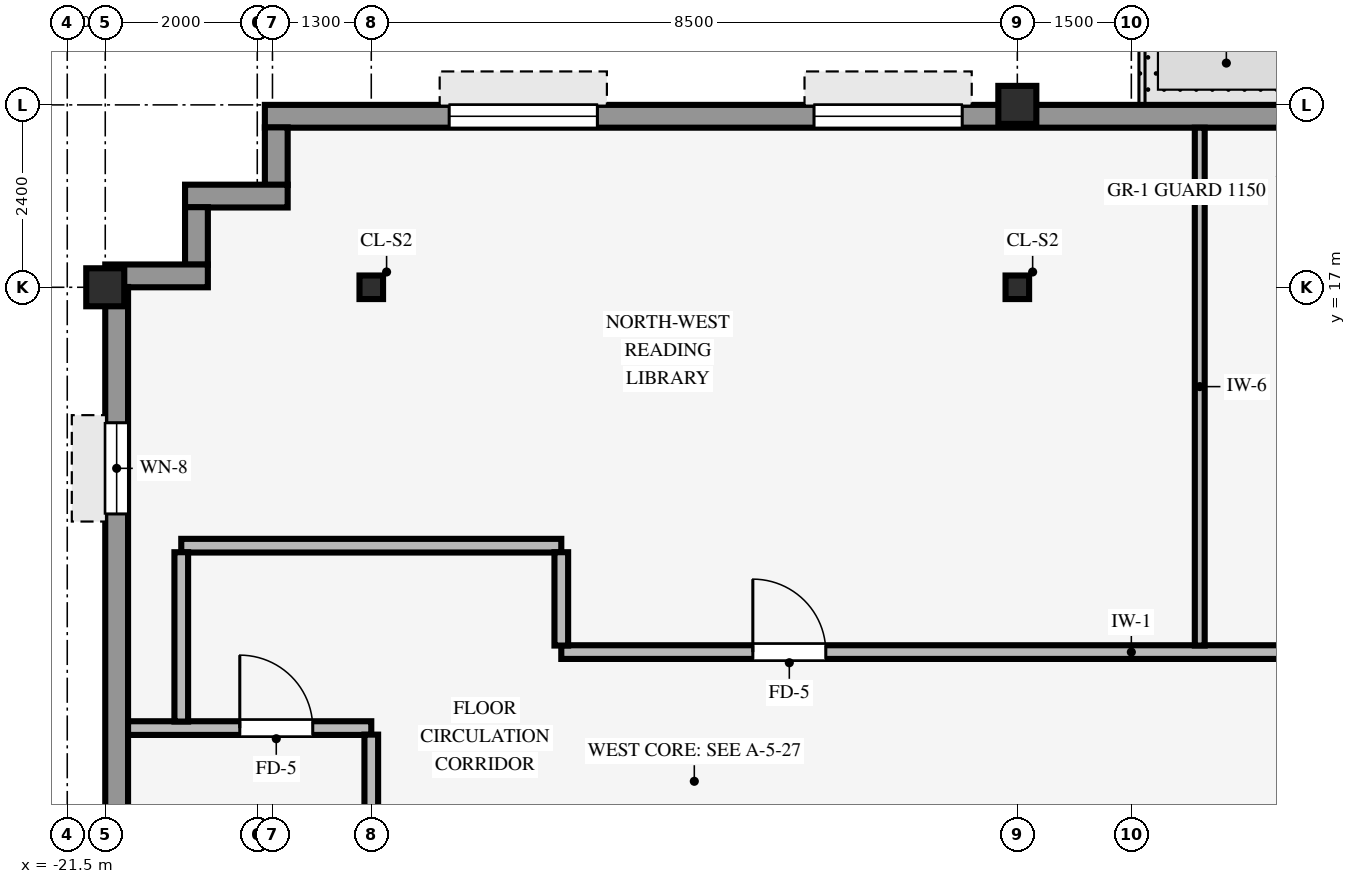
"""IFC4 building model, lengths in metres.
Left out: names, types, materials, properties, quantities, classifications, styles, units other than length and angle.
Written with IfcOpenShell. Run it as: python <this file> out.ifc"""

import sys

from ifc_helpers import new_model, si_unit, direction, frame, frame_2d, origin, origin_2d, place, context, subcontext, project, spatial, rectangle, hollow_rectangle, i_section, extrude, source, transform, mapped, element, fill, save


model = new_model("IFC4")
c1 = context("Model", 3, precision=1e-05, world=origin(), true_north=direction((0.0, 1.0)))
c2 = subcontext(c1, "Body", "Model", "MODEL_VIEW")
j1 = project(units=[si_unit("LENGTHUNIT", "METRE"), si_unit("PLANEANGLEUNIT", "RADIAN")], contexts=[c1])
p1 = place(None, origin())
s1 = spatial("IfcSite", under=j1, at=p1, CompositionType="ELEMENT")
p2 = place(p1, origin())
s2 = spatial("IfcBuilding", under=s1, at=p2, CompositionType="ELEMENT")
p3 = place(p2, frame((0.0, 0.0, 276.2)))
s3 = spatial("IfcBuildingStorey", under=s2, at=p3, CompositionType="ELEMENT", Elevation=276.2)
for number, where, z_axis, x_axis in (
    (1, (-21.0, 17.0, 0.0), (0.0, 0.0, 1.0), (1.0, 0.0, 0.0)),
    (2, (-9.0, 19.4, 0.0), (0.0, 0.0, 1.0), (1.0, 0.0, 0.0)),
):
    element("IfcColumn", number, at=place(p3, frame(where, z_axis=z_axis, x_axis=x_axis)), inside=s3, PredefinedType="COLUMN", context=c2, shape_type="SweptSolid", body=[
        extrude(hollow_rectangle(XDim=0.5, YDim=0.5, WallThickness=0.032, InnerFilletRadius=0.032, OuterFilletRadius=0.064, at=origin_2d()), origin(), (0.0, 0.0, 1.0), 3.37),
    ])
for number, where, z_axis, x_axis in (
    (3, (-17.5, 17.0, 0.0), (0.0, 0.0, 1.0), (1.0, 0.0, 0.0)),
    (4, (-9.0, 17.0, 0.0), (0.0, 0.0, 1.0), (1.0, 0.0, 0.0)),
):
    element("IfcColumn", number, at=place(p3, frame(where, z_axis=z_axis, x_axis=x_axis)), inside=s3, PredefinedType="COLUMN", context=c2, shape_type="SweptSolid", body=[
        extrude(i_section(OverallWidth=0.31, OverallDepth=0.31, WebThickness=0.015, FlangeThickness=0.015, FilletRadius=0.015, at=origin_2d()), origin(), (0.0, 0.0, 1.0), 3.37),
    ])
p4 = place(p3, frame((-18.9, 19.25, 0.0), z_axis=(0.0, 0.0, 1.0), x_axis=(1.0, 0.0, 0.0)))
e5 = element("IfcWall", 5, at=p4, inside=s3, PredefinedType="STANDARD", context=c2, shape_type="SweptSolid", body=[
    extrude(rectangle(XDim=35.6, YDim=0.3, at=frame_2d((17.8, 0.0))), origin(), (0.0, 0.0, 1.0), 2.705),
])
p5 = place(p4, frame((13.6, 0.0, 0.0)))
e6 = element("IfcOpeningElement", 6, at=p5, cuts=e5, PredefinedType="OPENING", context=c2, shape_type="SweptSolid", body=[
    extrude(rectangle(XDim=0.98, YDim=2.15, at=frame_2d((0.49, 1.075))), frame((0.0, 0.16, 0.0), z_axis=(0.0, -1.0, 0.0), x_axis=(1.0, 0.0, 0.0)), (0.0, 0.0, 1.0), 0.32),
])
p6 = place(p4, frame((2.425, 0.0, 0.8)))
e7 = element("IfcOpeningElement", 7, at=p6, cuts=e5, PredefinedType="OPENING", context=c2, shape_type="SweptSolid", body=[
    extrude(rectangle(XDim=1.95, YDim=1.48, at=frame_2d((0.975, 0.74))), frame((0.0, 0.16, 0.0), z_axis=(0.0, -1.0, 0.0), x_axis=(1.0, 0.0, 0.0)), (0.0, 0.0, 1.0), 0.32),
])
p7 = place(p4, frame((7.225, 0.0, 0.8)))
e8 = element("IfcOpeningElement", 8, at=p7, cuts=e5, PredefinedType="OPENING", context=c2, shape_type="SweptSolid", body=[
    extrude(rectangle(XDim=1.95, YDim=1.48, at=frame_2d((0.975, 0.74))), frame((0.0, 0.16, 0.0), z_axis=(0.0, -1.0, 0.0), x_axis=(1.0, 0.0, 0.0)), (0.0, 0.0, 1.0), 0.32),
])
p8 = place(p4, frame((15.925, 0.0, 0.8)))
e9 = element("IfcOpeningElement", 9, at=p8, cuts=e5, PredefinedType="OPENING", context=c2, shape_type="SweptSolid", body=[
    extrude(rectangle(XDim=1.95, YDim=1.48, at=frame_2d((0.975, 0.74))), frame((0.0, 0.16, 0.0), z_axis=(0.0, -1.0, 0.0), x_axis=(1.0, 0.0, 0.0)), (0.0, 0.0, 1.0), 0.32),
])
p9 = place(p4, frame((21.625, 0.0, 0.8)))
e10 = element("IfcOpeningElement", 10, at=p9, cuts=e5, PredefinedType="OPENING", context=c2, shape_type="SweptSolid", body=[
    extrude(rectangle(XDim=1.95, YDim=1.48, at=frame_2d((0.975, 0.74))), frame((0.0, 0.16, 0.0), z_axis=(0.0, -1.0, 0.0), x_axis=(1.0, 0.0, 0.0)), (0.0, 0.0, 1.0), 0.32),
])
p10 = place(p4, frame((31.225, 0.0, 0.8)))
e11 = element("IfcOpeningElement", 11, at=p10, cuts=e5, PredefinedType="OPENING", context=c2, shape_type="SweptSolid", body=[
    extrude(rectangle(XDim=1.95, YDim=1.48, at=frame_2d((0.975, 0.74))), frame((0.0, 0.16, 0.0), z_axis=(0.0, -1.0, 0.0), x_axis=(1.0, 0.0, 0.0)), (0.0, 0.0, 1.0), 0.32),
])
p11 = place(p3, frame((-18.75, 18.346, 0.0), z_axis=(0.0, 0.0, 1.0), x_axis=(0.0, 1.0, 0.0)))
e12 = element("IfcWall", 12, at=p11, inside=s3, PredefinedType="STANDARD", context=c2, shape_type="SweptSolid", body=[
    extrude(rectangle(XDim=0.758, YDim=0.3, at=frame_2d((0.379, 0.0))), origin(), (0.0, 0.0, 1.0), 2.892),
])
p12 = place(p3, frame((-19.95, 18.2, 0.0), z_axis=(0.0, 0.0, 1.0), x_axis=(1.0, 0.0, 0.0)))
e13 = element("IfcWall", 13, at=p12, inside=s3, PredefinedType="STANDARD", context=c2, shape_type="SweptSolid", body=[
    extrude(rectangle(XDim=1.35, YDim=0.3, at=frame_2d((0.675, 0.0))), origin(), (0.0, 0.0, 1.0), 2.892),
])
p13 = place(p3, frame((-19.8, 17.296, 0.0), z_axis=(0.0, 0.0, 1.0), x_axis=(0.0, 1.0, 0.0)))
e14 = element("IfcWall", 14, at=p13, inside=s3, PredefinedType="STANDARD", context=c2, shape_type="SweptSolid", body=[
    extrude(rectangle(XDim=0.758, YDim=0.3, at=frame_2d((0.379, 0.0))), origin(), (0.0, 0.0, 1.0), 2.892),
])
p14 = place(p3, frame((-21.0, 17.15, 0.0), z_axis=(0.0, 0.0, 1.0), x_axis=(1.0, 0.0, 0.0)))
e15 = element("IfcWall", 15, at=p14, inside=s3, PredefinedType="STANDARD", context=c2, shape_type="SweptSolid", body=[
    extrude(rectangle(XDim=1.35, YDim=0.3, at=frame_2d((0.675, 0.0))), origin(), (0.0, 0.0, 1.0), 2.892),
])
p15 = place(p3, frame((-20.85, -17.004, 0.0), z_axis=(0.0, 0.0, 1.0), x_axis=(0.0, 1.0, 0.0)))
e16 = element("IfcWall", 16, at=p15, inside=s3, PredefinedType="STANDARD", context=c2, shape_type="SweptSolid", body=[
    extrude(rectangle(XDim=34.008, YDim=0.3, at=frame_2d((17.004, 0.0))), origin(), (0.0, 0.0, 1.0), 2.705),
])
p16 = place(p15, frame((1.786, 0.0, 0.8)))
e17 = element("IfcOpeningElement", 17, at=p16, cuts=e16, PredefinedType="OPENING", context=c2, shape_type="SweptSolid", body=[
    extrude(rectangle(XDim=1.2, YDim=1.48, at=frame_2d((0.6, 0.74))), frame((0.0, 0.16, 0.0), z_axis=(0.0, -1.0, 0.0), x_axis=(1.0, 0.0, 0.0)), (0.0, 0.0, 1.0), 0.32),
])
p17 = place(p15, frame((8.159, 0.0, 0.8)))
e18 = element("IfcOpeningElement", 18, at=p17, cuts=e16, PredefinedType="OPENING", context=c2, shape_type="SweptSolid", body=[
    extrude(rectangle(XDim=1.2, YDim=1.48, at=frame_2d((0.6, 0.74))), frame((0.0, 0.16, 0.0), z_axis=(0.0, -1.0, 0.0), x_axis=(1.0, 0.0, 0.0)), (0.0, 0.0, 1.0), 0.32),
])
p18 = place(p15, frame((11.831, 0.0, 0.8)))
e19 = element("IfcOpeningElement", 19, at=p18, cuts=e16, PredefinedType="OPENING", context=c2, shape_type="SweptSolid", body=[
    extrude(rectangle(XDim=1.2, YDim=1.48, at=frame_2d((0.6, 0.74))), frame((0.0, 0.16, 0.0), z_axis=(0.0, -1.0, 0.0), x_axis=(1.0, 0.0, 0.0)), (0.0, 0.0, 1.0), 0.32),
])
p19 = place(p15, frame((15.054, 0.0, 0.8)))
e20 = element("IfcOpeningElement", 20, at=p19, cuts=e16, PredefinedType="OPENING", context=c2, shape_type="SweptSolid", body=[
    extrude(rectangle(XDim=1.2, YDim=1.48, at=frame_2d((0.6, 0.74))), frame((0.0, 0.16, 0.0), z_axis=(0.0, -1.0, 0.0), x_axis=(1.0, 0.0, 0.0)), (0.0, 0.0, 1.0), 0.32),
])
p20 = place(p15, frame((20.977, 0.0, 0.8)))
e21 = element("IfcOpeningElement", 21, at=p20, cuts=e16, PredefinedType="OPENING", context=c2, shape_type="SweptSolid", body=[
    extrude(rectangle(XDim=1.2, YDim=1.48, at=frame_2d((0.6, 0.74))), frame((0.0, 0.16, 0.0), z_axis=(0.0, -1.0, 0.0), x_axis=(1.0, 0.0, 0.0)), (0.0, 0.0, 1.0), 0.32),
])
p21 = place(p15, frame((24.649, 0.0, 0.8)))
e22 = element("IfcOpeningElement", 22, at=p21, cuts=e16, PredefinedType="OPENING", context=c2, shape_type="SweptSolid", body=[
    extrude(rectangle(XDim=1.2, YDim=1.48, at=frame_2d((0.6, 0.74))), frame((0.0, 0.16, 0.0), z_axis=(0.0, -1.0, 0.0), x_axis=(1.0, 0.0, 0.0)), (0.0, 0.0, 1.0), 0.32),
])
p22 = place(p15, frame((31.022, 0.0, 0.8)))
e23 = element("IfcOpeningElement", 23, at=p22, cuts=e16, PredefinedType="OPENING", context=c2, shape_type="SweptSolid", body=[
    extrude(rectangle(XDim=1.2, YDim=1.48, at=frame_2d((0.6, 0.74))), frame((0.0, 0.16, 0.0), z_axis=(0.0, -1.0, 0.0), x_axis=(1.0, 0.0, 0.0)), (0.0, 0.0, 1.0), 0.32),
])
p23 = place(p3, frame((-20.7, 11.2, 0.0), z_axis=(0.0, 0.0, 1.0), x_axis=(1.0, 0.0, 0.0)))
e24 = element("IfcWall", 24, at=p23, inside=s3, PredefinedType="PARTITIONING", context=c2, shape_type="SweptSolid", body=[
    extrude(rectangle(XDim=3.2, YDim=0.18, at=frame_2d((1.6, 0.0))), origin(), (0.0, 0.0, 1.0), 3.36),
])
p24 = place(p23, frame((1.47, 0.0, 0.0)))
e25 = element("IfcOpeningElement", 25, at=p24, cuts=e24, PredefinedType="OPENING", context=c2, shape_type="SweptSolid", body=[
    extrude(rectangle(XDim=0.96, YDim=2.1, at=frame_2d((0.48, 1.05))), frame((0.0, 0.1, 0.0), z_axis=(0.0, -1.0, 0.0), x_axis=(1.0, 0.0, 0.0)), (0.0, 0.0, 1.0), 0.2),
])
p25 = place(p3, frame((-15.0, 12.2, 0.0), z_axis=(0.0, 0.0, 1.0), x_axis=(1.0, 0.0, 0.0)))
e26 = element("IfcWall", 26, at=p25, inside=s3, PredefinedType="PARTITIONING", context=c2, shape_type="SweptSolid", body=[
    extrude(rectangle(XDim=30.8, YDim=0.18, at=frame_2d((15.4, 0.0))), origin(), (0.0, 0.0, 1.0), 3.36),
])
p26 = place(p25, frame((11.52, 0.0, 0.0)))
e27 = element("IfcOpeningElement", 27, at=p26, cuts=e26, PredefinedType="OPENING", context=c2, shape_type="SweptSolid", body=[
    extrude(rectangle(XDim=0.96, YDim=2.1, at=frame_2d((0.48, 1.05))), frame((0.0, 0.1, 0.0), z_axis=(0.0, -1.0, 0.0), x_axis=(1.0, 0.0, 0.0)), (0.0, 0.0, 1.0), 0.2),
])
p27 = place(p25, frame((2.52, 0.0, 0.0)))
e28 = element("IfcOpeningElement", 28, at=p27, cuts=e26, PredefinedType="OPENING", context=c2, shape_type="SweptSolid", body=[
    extrude(rectangle(XDim=0.96, YDim=2.1, at=frame_2d((0.48, 1.05))), frame((0.0, 0.1, 0.0), z_axis=(0.0, -1.0, 0.0), x_axis=(1.0, 0.0, 0.0)), (0.0, 0.0, 1.0), 0.2),
])
p28 = place(p25, frame((28.32, 0.0, 0.0)))
e29 = element("IfcOpeningElement", 29, at=p28, cuts=e26, PredefinedType="OPENING", context=c2, shape_type="SweptSolid", body=[
    extrude(rectangle(XDim=0.96, YDim=2.1, at=frame_2d((0.48, 1.05))), frame((0.0, 0.1, 0.0), z_axis=(0.0, -1.0, 0.0), x_axis=(1.0, 0.0, 0.0)), (0.0, 0.0, 1.0), 0.2),
])
p29 = place(p25, frame((24.92, 0.0, 0.0)))
e30 = element("IfcOpeningElement", 30, at=p29, cuts=e26, PredefinedType="OPENING", context=c2, shape_type="SweptSolid", body=[
    extrude(rectangle(XDim=0.96, YDim=2.1, at=frame_2d((0.48, 1.05))), frame((0.0, 0.1, 0.0), z_axis=(0.0, -1.0, 0.0), x_axis=(1.0, 0.0, 0.0)), (0.0, 0.0, 1.0), 0.2),
])
p30 = place(p25, frame((16.2, 0.0, 0.0)))
e31 = element("IfcOpeningElement", 31, at=p30, cuts=e26, PredefinedType="OPENING", context=c2, shape_type="SweptSolid", body=[
    extrude(rectangle(XDim=0.9, YDim=2.1, at=frame_2d((0.45, 1.05))), frame((0.0, 0.1, 0.0), z_axis=(0.0, -1.0, 0.0), x_axis=(1.0, 0.0, 0.0)), (0.0, 0.0, 1.0), 0.2),
])
p31 = place(p25, frame((18.3, 0.0, 0.0)))
e32 = element("IfcOpeningElement", 32, at=p31, cuts=e26, PredefinedType="OPENING", context=c2, shape_type="SweptSolid", body=[
    extrude(rectangle(XDim=0.9, YDim=2.1, at=frame_2d((0.45, 1.05))), frame((0.0, 0.1, 0.0), z_axis=(0.0, -1.0, 0.0), x_axis=(1.0, 0.0, 0.0)), (0.0, 0.0, 1.0), 0.2),
])
p32 = place(p25, frame((20.25, 0.0, 0.0)))
e33 = element("IfcOpeningElement", 33, at=p32, cuts=e26, PredefinedType="OPENING", context=c2, shape_type="SweptSolid", body=[
    extrude(rectangle(XDim=0.9, YDim=2.1, at=frame_2d((0.45, 1.05))), frame((0.0, 0.1, 0.0), z_axis=(0.0, -1.0, 0.0), x_axis=(1.0, 0.0, 0.0)), (0.0, 0.0, 1.0), 0.2),
])
p33 = place(p3, frame((-20.0, 13.6, 0.0), z_axis=(0.0, 0.0, 1.0), x_axis=(1.0, 0.0, 0.0)))
e34 = element("IfcWall", 34, at=p33, inside=s3, PredefinedType="PARTITIONING", context=c2, shape_type="SweptSolid", body=[
    extrude(rectangle(XDim=5.0, YDim=0.18, at=frame_2d((2.5, 0.0))), origin(), (0.0, 0.0, 1.0), 3.038),
])
p34 = place(p3, frame((-20.0, 11.286, 0.0), z_axis=(0.0, 0.0, 1.0), x_axis=(0.0, 1.0, 0.0)))
e35 = element("IfcWall", 35, at=p34, inside=s3, PredefinedType="PARTITIONING", context=c2, shape_type="SweptSolid", body=[
    extrude(rectangle(XDim=2.228, YDim=0.18, at=frame_2d((1.114, 0.0))), origin(), (0.0, 0.0, 1.0), 3.36),
])
p35 = place(p3, frame((-17.5, 9.996, 0.0), z_axis=(0.0, 0.0, 1.0), x_axis=(0.0, 1.0, 0.0)))
e36 = element("IfcWall", 36, at=p35, inside=s3, PredefinedType="PARTITIONING", context=c2, shape_type="SweptSolid", body=[
    extrude(rectangle(XDim=1.118, YDim=0.18, at=frame_2d((0.559, 0.0))), origin(), (0.0, 0.0, 1.0), 2.892),
])
p36 = place(p3, frame((-15.0, 12.286, 0.0), z_axis=(0.0, 0.0, 1.0), x_axis=(0.0, 1.0, 0.0)))
e37 = element("IfcWall", 37, at=p36, inside=s3, PredefinedType="PARTITIONING", context=c2, shape_type="SweptSolid", body=[
    extrude(rectangle(XDim=1.228, YDim=0.18, at=frame_2d((0.614, 0.0))), origin(), (0.0, 0.0, 1.0), 3.36),
])
p37 = place(p3, frame((-6.6, 12.286, 0.0), z_axis=(0.0, 0.0, 1.0), x_axis=(0.0, 1.0, 0.0)))
e38 = element("IfcWall", 38, at=p37, inside=s3, PredefinedType="PARTITIONING", context=c2, shape_type="SweptSolid", body=[
    extrude(rectangle(XDim=6.814, YDim=0.13, at=frame_2d((3.407, 0.0))), origin(), (0.0, 0.0, 1.0), 3.36),
])
m1 = source(origin(), c2, "Body", "SweptSolid", [
    extrude(rectangle(XDim=1.95, YDim=1.48, at=frame_2d((0.975, 0.74))), frame((0.0, 0.03, 0.0), z_axis=(0.0, -1.0, 0.0), x_axis=(1.0, 0.0, 0.0)), (0.0, 0.0, 1.0), 0.06),
])
p38 = place(p6, origin())
e39 = element("IfcWindow", 39, at=p38, inside=s3, PartitioningType="SINGLE_PANEL", PredefinedType="WINDOW", context=c2, shape_type="MappedRepresentation", body=[
    mapped(m1, transform((0.0, 0.0, 0.0), scale=1.0)),
])
fill(e7, e39)
p39 = place(p7, origin())
e40 = element("IfcWindow", 40, at=p39, inside=s3, PartitioningType="SINGLE_PANEL", PredefinedType="WINDOW", context=c2, shape_type="MappedRepresentation", body=[
    mapped(m1, transform((0.0, 0.0, 0.0), scale=1.0)),
])
fill(e8, e40)
m2 = source(origin(), c2, "Body", "SweptSolid", [
    extrude(rectangle(XDim=1.2, YDim=1.48, at=frame_2d((0.6, 0.74))), frame((0.0, 0.03, 0.0), z_axis=(0.0, -1.0, 0.0), x_axis=(1.0, 0.0, 0.0)), (0.0, 0.0, 1.0), 0.06),
])
p40 = place(p22, origin())
e41 = element("IfcWindow", 41, at=p40, inside=s3, PartitioningType="SINGLE_PANEL", PredefinedType="WINDOW", context=c2, shape_type="MappedRepresentation", body=[
    mapped(m2, transform((0.0, 0.0, 0.0), scale=1.0)),
])
fill(e23, e41)
m3 = source(origin(), c2, "Body", "SweptSolid", [
    extrude(rectangle(XDim=0.96, YDim=2.1, at=frame_2d((0.48, 1.05))), frame((0.0, 0.025, 0.0), z_axis=(0.0, -1.0, 0.0), x_axis=(1.0, 0.0, 0.0)), (0.0, 0.0, 1.0), 0.05),
])
p41 = place(p27, origin())
e42 = element("IfcDoor", 42, at=p41, inside=s3, OperationType="SINGLE_SWING_LEFT", PredefinedType="DOOR", context=c2, shape_type="MappedRepresentation", body=[
    mapped(m3, transform((0.0, 0.0, 0.0), scale=1.0)),
])
fill(e28, e42)
p42 = place(p24, origin())
e43 = element("IfcDoor", 43, at=p42, inside=s3, OperationType="SINGLE_SWING_LEFT", PredefinedType="DOOR", context=c2, shape_type="MappedRepresentation", body=[
    mapped(m3, transform((0.0, 0.0, 0.0), scale=1.0)),
])
fill(e25, e43)
save(model, sys.argv[1])
